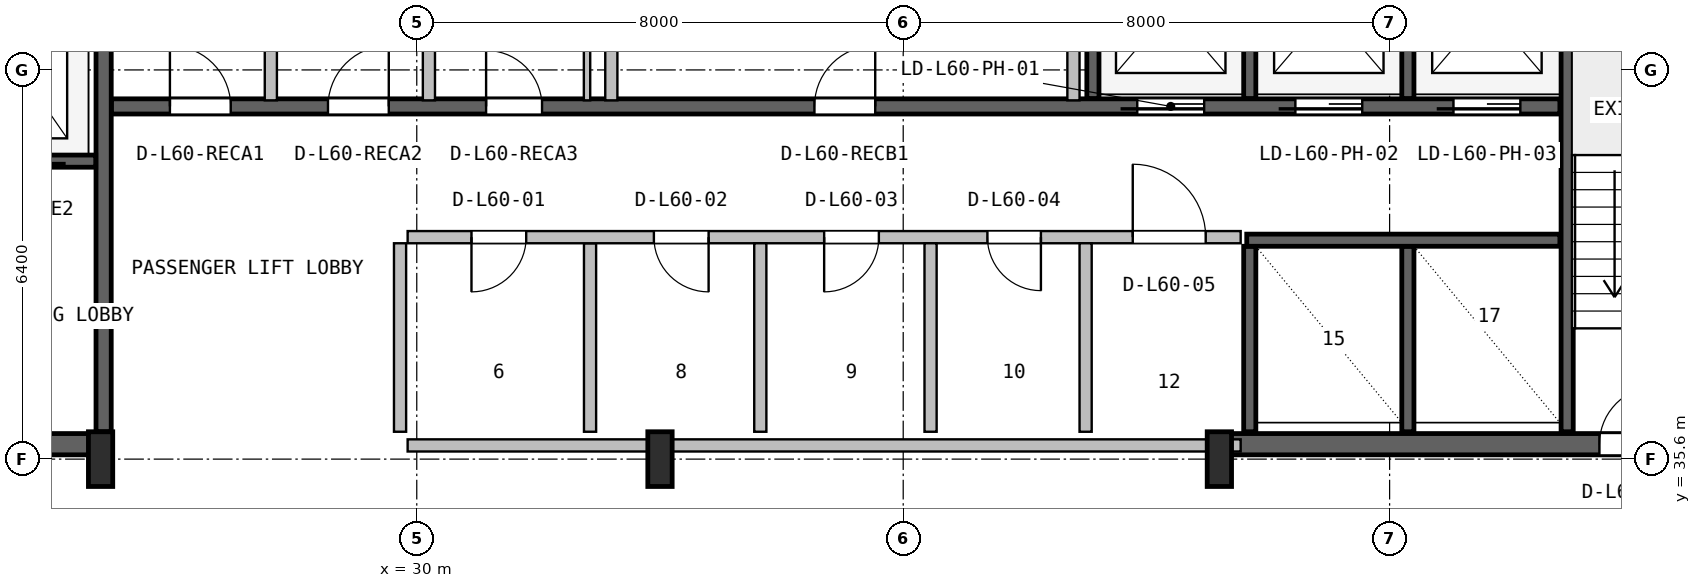
"""IFC4 building model, lengths in metres.
Left out: names, types, materials, properties, quantities, classifications, styles, units other than length and angle.
Written with IfcOpenShell. Run it as: python <this file> out.ifc"""

import sys

from ifc_helpers import new_model, si_unit, direction, frame, frame_2d, origin, origin_2d, place, context, subcontext, project, spatial, rectangle, i_section, extrude, source, transform, mapped, element, fill, save


model = new_model("IFC4")
c1 = context("Model", 3, precision=1e-05, world=origin(), true_north=direction((0.0, 1.0)))
c2 = subcontext(c1, "Body", "Model", "MODEL_VIEW")
j1 = project(units=[si_unit("LENGTHUNIT", "METRE"), si_unit("PLANEANGLEUNIT", "RADIAN")], contexts=[c1])
p1 = place(None, origin())
s1 = spatial("IfcSite", under=j1, at=p1, CompositionType="ELEMENT")
p2 = place(p1, origin())
s2 = spatial("IfcBuilding", under=s1, at=p2, CompositionType="ELEMENT")
p3 = place(p2, frame((0.0, 0.0, 243.2)))
s3 = spatial("IfcBuildingStorey", under=s2, at=p3, CompositionType="ELEMENT", Elevation=243.2)
p4 = place(p3, frame((15.67, 35.845, 0.0), z_axis=(0.0, 0.0, 1.0), x_axis=(1.0, 0.0, 0.0)))
e1 = element("IfcWall", 1, at=p4, inside=s3, PredefinedType="SHEAR", context=c2, shape_type="SweptSolid", body=[
    extrude(rectangle(XDim=9.13, YDim=0.35, at=frame_2d((4.565, 0.0))), origin(), (0.0, 0.0, 1.0), 3.55),
])
p5 = place(p4, frame((5.4, 0.0, 0.0)))
e2 = element("IfcOpeningElement", 2, at=p5, cuts=e1, PredefinedType="OPENING", context=c2, shape_type="SweptSolid", body=[
    extrude(rectangle(XDim=1.0, YDim=2.1, at=frame_2d((0.5, 1.05))), frame((0.0, 0.185, 0.0), z_axis=(0.0, -1.0, 0.0), x_axis=(1.0, 0.0, 0.0)), (0.0, 0.0, 1.0), 0.37),
])
p6 = place(p3, frame((43.2, 35.845, 0.0), z_axis=(0.0, 0.0, 1.0), x_axis=(1.0, 0.0, 0.0)))
e3 = element("IfcWall", 3, at=p6, inside=s3, PredefinedType="SHEAR", context=c2, shape_type="SweptSolid", body=[
    extrude(rectangle(XDim=9.13, YDim=0.35, at=frame_2d((4.565, 0.0))), origin(), (0.0, 0.0, 1.0), 3.55),
])
p7 = place(p6, frame((6.25, 0.0, 0.0)))
e4 = element("IfcOpeningElement", 4, at=p7, cuts=e3, PredefinedType="OPENING", context=c2, shape_type="SweptSolid", body=[
    extrude(rectangle(XDim=0.95, YDim=2.1, at=frame_2d((0.475, 1.05))), frame((0.0, 0.185, 0.0), z_axis=(0.0, -1.0, 0.0), x_axis=(1.0, 0.0, 0.0)), (0.0, 0.0, 1.0), 0.37),
])
m1 = source(origin(), c2, "Body", "SweptSolid", [
    extrude(i_section(OverallWidth=0.4, OverallDepth=0.9, WebThickness=0.016, FlangeThickness=0.028, FilletRadius=0.016, at=origin_2d()), origin(), (0.0, 0.0, 1.0), 3.8),
])
for number, where, z_axis, x_axis in (
    (5, (24.8, 35.6, 0.0), (0.0, 0.0, 1.0), (1.0, 0.0, 0.0)),
    (6, (34.0, 35.6, 0.0), (0.0, 0.0, 1.0), (1.0, 0.0, 0.0)),
    (7, (43.2, 35.6, 0.0), (0.0, 0.0, 1.0), (1.0, 0.0, 0.0)),
):
    element("IfcColumn", number, at=place(p3, frame(where, z_axis=z_axis, x_axis=x_axis)), inside=s3, PredefinedType="COLUMN", context=c2, shape_type="MappedRepresentation", body=[
        mapped(m1, transform((0.0, 0.0, 0.0), x_axis=(1.0, 0.0, 0.0), y_axis=(0.0, 1.0, 0.0), z_axis=(0.0, 0.0, 1.0), scale=1.0)),
    ])
p8 = place(p3, frame((24.85, 36.05, 0.0), z_axis=(0.0, 0.0, 1.0), x_axis=(0.0, 1.0, 0.0)))
e8 = element("IfcWall", 8, at=p8, inside=s3, PredefinedType="SHEAR", context=c2, shape_type="SweptSolid", body=[
    extrude(rectangle(XDim=10.45, YDim=0.25, at=frame_2d((5.225, 0.0))), origin(), (0.0, 0.0, 1.0), 3.55),
])
p9 = place(p3, frame((19.2, 40.5, 0.0), z_axis=(0.0, 0.0, 1.0), x_axis=(1.0, 0.0, 0.0)))
e9 = element("IfcWall", 9, at=p9, inside=s3, PredefinedType="SHEAR", context=c2, shape_type="SweptSolid", body=[
    extrude(rectangle(XDim=5.52, YDim=0.2, at=frame_2d((2.76, 0.0))), origin(), (0.0, 0.0, 1.0), 3.55),
])
p10 = place(p9, frame((1.05, 0.0, 0.0)))
e10 = element("IfcOpeningElement", 10, at=p10, cuts=e9, PredefinedType="OPENING", context=c2, shape_type="SweptSolid", body=[
    extrude(rectangle(XDim=1.1, YDim=2.18, at=frame_2d((0.55, 1.09))), frame((0.0, 0.11, 0.0), z_axis=(0.0, -1.0, 0.0), x_axis=(1.0, 0.0, 0.0)), (0.0, 0.0, 1.0), 0.22),
])
p11 = place(p9, frame((3.65, 0.0, 0.0)))
e11 = element("IfcOpeningElement", 11, at=p11, cuts=e9, PredefinedType="OPENING", context=c2, shape_type="SweptSolid", body=[
    extrude(rectangle(XDim=1.1, YDim=2.18, at=frame_2d((0.55, 1.09))), frame((0.0, 0.11, 0.0), z_axis=(0.0, -1.0, 0.0), x_axis=(1.0, 0.0, 0.0)), (0.0, 0.0, 1.0), 0.22),
])
p12 = place(p3, frame((48.92, 36.05, 0.0), z_axis=(0.0, 0.0, 1.0), x_axis=(0.0, 1.0, 0.0)))
e12 = element("IfcWall", 12, at=p12, inside=s3, PredefinedType="SHEAR", context=c2, shape_type="SweptSolid", body=[
    extrude(rectangle(XDim=10.5, YDim=0.2, at=frame_2d((5.25, 0.0))), origin(), (0.0, 0.0, 1.0), 3.55),
])
p13 = place(p3, frame((24.98, 41.4, 0.0), z_axis=(0.0, 0.0, 1.0), x_axis=(1.0, 0.0, 0.0)))
e13 = element("IfcWall", 13, at=p13, inside=s3, PredefinedType="SHEAR", context=c2, shape_type="SweptSolid", body=[
    extrude(rectangle(XDim=23.82, YDim=0.25, at=frame_2d((11.91, 0.0))), origin(), (0.0, 0.0, 1.0), 3.55),
])
p14 = place(p13, frame((16.87, 0.0, 0.0)))
e14 = element("IfcOpeningElement", 14, at=p14, cuts=e13, PredefinedType="OPENING", context=c2, shape_type="SweptSolid", body=[
    extrude(rectangle(XDim=1.1, YDim=2.18, at=frame_2d((0.55, 1.09))), frame((0.0, 0.135, 0.0), z_axis=(0.0, -1.0, 0.0), x_axis=(1.0, 0.0, 0.0)), (0.0, 0.0, 1.0), 0.27),
])
p15 = place(p13, frame((19.47, 0.0, 0.0)))
e15 = element("IfcOpeningElement", 15, at=p15, cuts=e13, PredefinedType="OPENING", context=c2, shape_type="SweptSolid", body=[
    extrude(rectangle(XDim=1.1, YDim=2.18, at=frame_2d((0.55, 1.09))), frame((0.0, 0.135, 0.0), z_axis=(0.0, -1.0, 0.0), x_axis=(1.0, 0.0, 0.0)), (0.0, 0.0, 1.0), 0.27),
])
p16 = place(p13, frame((22.07, 0.0, 0.0)))
e16 = element("IfcOpeningElement", 16, at=p16, cuts=e13, PredefinedType="OPENING", context=c2, shape_type="SweptSolid", body=[
    extrude(rectangle(XDim=1.1, YDim=2.18, at=frame_2d((0.55, 1.09))), frame((0.0, 0.135, 0.0), z_axis=(0.0, -1.0, 0.0), x_axis=(1.0, 0.0, 0.0)), (0.0, 0.0, 1.0), 0.27),
])
p17 = place(p13, frame((0.96, 0.0, 0.0)))
e17 = element("IfcOpeningElement", 17, at=p17, cuts=e13, PredefinedType="OPENING", context=c2, shape_type="SweptSolid", body=[
    extrude(rectangle(XDim=1.0, YDim=2.08, at=frame_2d((0.5, 1.04))), frame((0.0, 0.135, 0.0), z_axis=(0.0, -1.0, 0.0), x_axis=(1.0, 0.0, 0.0)), (0.0, 0.0, 1.0), 0.27),
])
p18 = place(p13, frame((3.56, 0.0, 0.0)))
e18 = element("IfcOpeningElement", 18, at=p18, cuts=e13, PredefinedType="OPENING", context=c2, shape_type="SweptSolid", body=[
    extrude(rectangle(XDim=1.0, YDim=2.08, at=frame_2d((0.5, 1.04))), frame((0.0, 0.135, 0.0), z_axis=(0.0, -1.0, 0.0), x_axis=(1.0, 0.0, 0.0)), (0.0, 0.0, 1.0), 0.27),
])
p19 = place(p13, frame((6.16, 0.0, 0.0)))
e19 = element("IfcOpeningElement", 19, at=p19, cuts=e13, PredefinedType="OPENING", context=c2, shape_type="SweptSolid", body=[
    extrude(rectangle(XDim=0.92, YDim=2.08, at=frame_2d((0.46, 1.04))), frame((0.0, 0.135, 0.0), z_axis=(0.0, -1.0, 0.0), x_axis=(1.0, 0.0, 0.0)), (0.0, 0.0, 1.0), 0.27),
])
p20 = place(p13, frame((11.56, 0.0, 0.0)))
e20 = element("IfcOpeningElement", 20, at=p20, cuts=e13, PredefinedType="OPENING", context=c2, shape_type="SweptSolid", body=[
    extrude(rectangle(XDim=1.0, YDim=2.08, at=frame_2d((0.5, 1.04))), frame((0.0, 0.135, 0.0), z_axis=(0.0, -1.0, 0.0), x_axis=(1.0, 0.0, 0.0)), (0.0, 0.0, 1.0), 0.27),
])
p21 = place(p3, frame((41.12, 41.53, 0.0), z_axis=(0.0, 0.0, 1.0), x_axis=(0.0, 1.0, 0.0)))
e21 = element("IfcWall", 21, at=p21, inside=s3, PredefinedType="SHEAR", context=c2, shape_type="SweptSolid", body=[
    extrude(rectangle(XDim=5.02, YDim=0.2, at=frame_2d((2.51, 0.0))), origin(), (0.0, 0.0, 1.0), 3.55),
])
for number, where, z_axis, x_axis in (
    (22, (43.7, 41.53, 0.0), (0.0, 0.0, 1.0), (0.0, 1.0, 0.0)),
    (23, (46.3, 41.53, 0.0), (0.0, 0.0, 1.0), (0.0, 1.0, 0.0)),
):
    element("IfcWall", number, at=place(p3, frame(where, z_axis=z_axis, x_axis=x_axis)), inside=s3, PredefinedType="SHEAR", context=c2, shape_type="SweptSolid", body=[
        extrude(rectangle(XDim=2.87, YDim=0.2, at=frame_2d((1.435, 0.0))), origin(), (0.0, 0.0, 1.0), 3.55),
    ])
for number, where, z_axis, x_axis in (
    (24, (43.7, 36.05, 0.0), (0.0, 0.0, 1.0), (0.0, 1.0, 0.0)),
    (25, (46.3, 36.05, 0.0), (0.0, 0.0, 1.0), (0.0, 1.0, 0.0)),
):
    element("IfcWall", number, at=place(p3, frame(where, z_axis=z_axis, x_axis=x_axis)), inside=s3, PredefinedType="SHEAR", context=c2, shape_type="SweptSolid", body=[
        extrude(rectangle(XDim=3.05, YDim=0.2, at=frame_2d((1.525, 0.0))), origin(), (0.0, 0.0, 1.0), 3.55),
    ])
p22 = place(p3, frame((43.65, 39.2, 0.0), z_axis=(0.0, 0.0, 1.0), x_axis=(1.0, 0.0, 0.0)))
e26 = element("IfcWall", 26, at=p22, inside=s3, PredefinedType="SHEAR", context=c2, shape_type="SweptSolid", body=[
    extrude(rectangle(XDim=5.15, YDim=0.2, at=frame_2d((2.575, 0.0))), origin(), (0.0, 0.0, 1.0), 3.55),
])
p23 = place(p3, frame((29.85, 35.825, 0.0), z_axis=(0.0, 0.0, 1.0), x_axis=(1.0, 0.0, 0.0)))
e27 = element("IfcWall", 27, at=p23, inside=s3, PredefinedType="SOLIDWALL", context=c2, shape_type="SweptSolid", body=[
    extrude(rectangle(XDim=13.7, YDim=0.2, at=frame_2d((6.85, 0.0))), origin(), (0.0, 0.0, 1.0), 2.575),
])
p24 = place(p3, frame((32.85, 36.05, 0.0), z_axis=(0.0, 0.0, 1.0), x_axis=(0.0, 1.0, 0.0)))
e28 = element("IfcWall", 28, at=p24, inside=s3, PredefinedType="PLUMBINGWALL", context=c2, shape_type="SweptSolid", body=[
    extrude(rectangle(XDim=3.1, YDim=0.2, at=frame_2d((1.55, 0.0))), origin(), (0.0, 0.0, 1.0), 3.53),
])
p25 = place(p3, frame((29.85, 39.25, 0.0), z_axis=(0.0, 0.0, 1.0), x_axis=(1.0, 0.0, 0.0)))
e29 = element("IfcWall", 29, at=p25, inside=s3, PredefinedType="SOLIDWALL", context=c2, shape_type="SweptSolid", body=[
    extrude(rectangle(XDim=13.7, YDim=0.2, at=frame_2d((6.85, 0.0))), origin(), (0.0, 0.0, 1.0), 3.53),
])
p26 = place(p25, frame((1.05, 0.0, 0.0)))
e30 = element("IfcOpeningElement", 30, at=p26, cuts=e29, PredefinedType="OPENING", context=c2, shape_type="SweptSolid", body=[
    extrude(rectangle(XDim=0.9, YDim=2.06, at=frame_2d((0.45, 1.03))), frame((0.0, 0.11, 0.0), z_axis=(0.0, -1.0, 0.0), x_axis=(1.0, 0.0, 0.0)), (0.0, 0.0, 1.0), 0.22),
])
p27 = place(p25, frame((4.05, 0.0, 0.0)))
e31 = element("IfcOpeningElement", 31, at=p27, cuts=e29, PredefinedType="OPENING", context=c2, shape_type="SweptSolid", body=[
    extrude(rectangle(XDim=0.9, YDim=2.06, at=frame_2d((0.45, 1.03))), frame((0.0, 0.11, 0.0), z_axis=(0.0, -1.0, 0.0), x_axis=(1.0, 0.0, 0.0)), (0.0, 0.0, 1.0), 0.22),
])
p28 = place(p25, frame((6.85, 0.0, 0.0)))
e32 = element("IfcOpeningElement", 32, at=p28, cuts=e29, PredefinedType="OPENING", context=c2, shape_type="SweptSolid", body=[
    extrude(rectangle(XDim=0.9, YDim=2.06, at=frame_2d((0.45, 1.03))), frame((0.0, 0.11, 0.0), z_axis=(0.0, -1.0, 0.0), x_axis=(1.0, 0.0, 0.0)), (0.0, 0.0, 1.0), 0.22),
])
p29 = place(p25, frame((9.535, 0.0, 0.0)))
e33 = element("IfcOpeningElement", 33, at=p29, cuts=e29, PredefinedType="OPENING", context=c2, shape_type="SweptSolid", body=[
    extrude(rectangle(XDim=0.88, YDim=2.06, at=frame_2d((0.44, 1.03))), frame((0.0, 0.11, 0.0), z_axis=(0.0, -1.0, 0.0), x_axis=(1.0, 0.0, 0.0)), (0.0, 0.0, 1.0), 0.22),
])
p30 = place(p25, frame((11.925, 0.0, 0.0)))
e34 = element("IfcOpeningElement", 34, at=p30, cuts=e29, PredefinedType="OPENING", context=c2, shape_type="SweptSolid", body=[
    extrude(rectangle(XDim=1.2, YDim=2.1, at=frame_2d((0.6, 1.05))), frame((0.0, 0.11, 0.0), z_axis=(0.0, -1.0, 0.0), x_axis=(1.0, 0.0, 0.0)), (0.0, 0.0, 1.0), 0.22),
])
for number, where, z_axis, x_axis in (
    (35, (29.725, 36.05, 0.0), (0.0, 0.0, 1.0), (0.0, 1.0, 0.0)),
    (36, (35.65, 36.05, 0.0), (0.0, 0.0, 1.0), (0.0, 1.0, 0.0)),
    (37, (38.45, 36.05, 0.0), (0.0, 0.0, 1.0), (0.0, 1.0, 0.0)),
):
    element("IfcWall", number, at=place(p3, frame(where, z_axis=z_axis, x_axis=x_axis)), inside=s3, PredefinedType="PLUMBINGWALL", context=c2, shape_type="SweptSolid", body=[
        extrude(rectangle(XDim=3.1, YDim=0.2, at=frame_2d((1.55, 0.0))), origin(), (0.0, 0.0, 1.0), 3.53),
    ])
p31 = place(p3, frame((41.0, 36.05, 0.0), z_axis=(0.0, 0.0, 1.0), x_axis=(0.0, 1.0, 0.0)))
e38 = element("IfcWall", 38, at=p31, inside=s3, PredefinedType="SOLIDWALL", context=c2, shape_type="SweptSolid", body=[
    extrude(rectangle(XDim=3.1, YDim=0.2, at=frame_2d((1.55, 0.0))), origin(), (0.0, 0.0, 1.0), 3.53),
])
for number, where, z_axis, x_axis in (
    (39, (27.6, 41.5, 0.0), (0.0, 0.0, 1.0), (0.0, 1.0, 0.0)),
    (40, (30.2, 41.5, 0.0), (0.0, 0.0, 1.0), (0.0, 1.0, 0.0)),
):
    element("IfcWall", number, at=place(p3, frame(where, z_axis=z_axis, x_axis=x_axis)), inside=s3, PredefinedType="SOLIDWALL", context=c2, shape_type="SweptSolid", body=[
        extrude(rectangle(XDim=5.02, YDim=0.2, at=frame_2d((2.51, 0.0))), origin(), (0.0, 0.0, 1.0), 3.53),
    ])
p32 = place(p3, frame((32.8, 41.5, 0.0), z_axis=(0.0, 0.0, 1.0), x_axis=(0.0, 1.0, 0.0)))
e41 = element("IfcWall", 41, at=p32, inside=s3, PredefinedType="PARTITIONING", context=c2, shape_type="SweptSolid", body=[
    extrude(rectangle(XDim=5.02, YDim=0.105, at=frame_2d((2.51, 0.0))), origin(), (0.0, 0.0, 1.0), 3.53),
])
for number, where, z_axis, x_axis in (
    (42, (40.8, 41.5, 0.0), (0.0, 0.0, 1.0), (0.0, 1.0, 0.0)),
    (43, (33.2, 41.5, 0.0), (0.0, 0.0, 1.0), (0.0, 1.0, 0.0)),
):
    element("IfcWall", number, at=place(p3, frame(where, z_axis=z_axis, x_axis=x_axis)), inside=s3, PredefinedType="SOLIDWALL", context=c2, shape_type="SweptSolid", body=[
        extrude(rectangle(XDim=5.02, YDim=0.2, at=frame_2d((2.51, 0.0))), origin(), (0.0, 0.0, 1.0), 3.53),
    ])
m2 = source(origin(), c2, "Body", "SweptSolid", [
    extrude(rectangle(XDim=0.95, YDim=2.1, at=frame_2d((0.475, 1.05))), frame((0.0, 0.025, 0.0), z_axis=(0.0, -1.0, 0.0), x_axis=(1.0, 0.0, 0.0)), (0.0, 0.0, 1.0), 0.05),
])
p33 = place(p7, origin())
e44 = element("IfcDoor", 44, at=p33, inside=s3, OperationType="SINGLE_SWING_RIGHT", PredefinedType="DOOR", context=c2, shape_type="MappedRepresentation", body=[
    mapped(m2, transform((0.0, 0.0, 0.0), x_axis=(1.0, 0.0, 0.0), y_axis=(0.0, 1.0, 0.0), z_axis=(0.0, 0.0, 1.0), scale=1.0)),
])
fill(e4, e44)
m3 = source(origin(), c2, "Body", "SweptSolid", [
    extrude(rectangle(XDim=1.1, YDim=2.18, at=frame_2d((0.55, 1.09))), frame((0.0, 0.025, 0.0), z_axis=(0.0, -1.0, 0.0), x_axis=(1.0, 0.0, 0.0)), (0.0, 0.0, 1.0), 0.05),
])
p34 = place(p14, frame((1.1, 0.0, 0.0), z_axis=(0.0, 0.0, 1.0), x_axis=(-1.0, 0.0, 0.0)))
e45 = element("IfcDoor", 45, at=p34, inside=s3, OperationType="SLIDING_TO_LEFT", PredefinedType="DOOR", context=c2, shape_type="MappedRepresentation", body=[
    mapped(m3, transform((0.0, 0.0, 0.0), x_axis=(1.0, 0.0, 0.0), y_axis=(0.0, 1.0, 0.0), z_axis=(0.0, 0.0, 1.0), scale=1.0)),
])
fill(e14, e45)
p35 = place(p15, frame((1.1, 0.0, 0.0), z_axis=(0.0, 0.0, 1.0), x_axis=(-1.0, 0.0, 0.0)))
e46 = element("IfcDoor", 46, at=p35, inside=s3, OperationType="SLIDING_TO_LEFT", PredefinedType="DOOR", context=c2, shape_type="MappedRepresentation", body=[
    mapped(m3, transform((0.0, 0.0, 0.0), x_axis=(1.0, 0.0, 0.0), y_axis=(0.0, 1.0, 0.0), z_axis=(0.0, 0.0, 1.0), scale=1.0)),
])
fill(e15, e46)
p36 = place(p16, frame((1.1, 0.0, 0.0), z_axis=(0.0, 0.0, 1.0), x_axis=(-1.0, 0.0, 0.0)))
e47 = element("IfcDoor", 47, at=p36, inside=s3, OperationType="SLIDING_TO_LEFT", PredefinedType="DOOR", context=c2, shape_type="MappedRepresentation", body=[
    mapped(m3, transform((0.0, 0.0, 0.0), x_axis=(1.0, 0.0, 0.0), y_axis=(0.0, 1.0, 0.0), z_axis=(0.0, 0.0, 1.0), scale=1.0)),
])
fill(e16, e47)
m4 = source(origin(), c2, "Body", "SweptSolid", [
    extrude(rectangle(XDim=1.0, YDim=2.08, at=frame_2d((0.5, 1.04))), frame((0.0, 0.025, 0.0), z_axis=(0.0, -1.0, 0.0), x_axis=(1.0, 0.0, 0.0)), (0.0, 0.0, 1.0), 0.05),
])
p37 = place(p17, origin())
e48 = element("IfcDoor", 48, at=p37, inside=s3, OperationType="SINGLE_SWING_LEFT", PredefinedType="DOOR", context=c2, shape_type="MappedRepresentation", body=[
    mapped(m4, transform((0.0, 0.0, 0.0), x_axis=(1.0, 0.0, 0.0), y_axis=(0.0, 1.0, 0.0), z_axis=(0.0, 0.0, 1.0), scale=1.0)),
])
fill(e17, e48)
p38 = place(p18, origin())
e49 = element("IfcDoor", 49, at=p38, inside=s3, OperationType="SINGLE_SWING_RIGHT", PredefinedType="DOOR", context=c2, shape_type="MappedRepresentation", body=[
    mapped(m4, transform((0.0, 0.0, 0.0), x_axis=(1.0, 0.0, 0.0), y_axis=(0.0, 1.0, 0.0), z_axis=(0.0, 0.0, 1.0), scale=1.0)),
])
fill(e18, e49)
m5 = source(origin(), c2, "Body", "SweptSolid", [
    extrude(rectangle(XDim=0.92, YDim=2.08, at=frame_2d((0.46, 1.04))), frame((0.0, 0.025, 0.0), z_axis=(0.0, -1.0, 0.0), x_axis=(1.0, 0.0, 0.0)), (0.0, 0.0, 1.0), 0.05),
])
p39 = place(p19, origin())
e50 = element("IfcDoor", 50, at=p39, inside=s3, OperationType="SINGLE_SWING_LEFT", PredefinedType="DOOR", context=c2, shape_type="MappedRepresentation", body=[
    mapped(m5, transform((0.0, 0.0, 0.0), x_axis=(1.0, 0.0, 0.0), y_axis=(0.0, 1.0, 0.0), z_axis=(0.0, 0.0, 1.0), scale=1.0)),
])
fill(e19, e50)
p40 = place(p20, origin())
e51 = element("IfcDoor", 51, at=p40, inside=s3, OperationType="SINGLE_SWING_RIGHT", PredefinedType="DOOR", context=c2, shape_type="MappedRepresentation", body=[
    mapped(m4, transform((0.0, 0.0, 0.0), x_axis=(1.0, 0.0, 0.0), y_axis=(0.0, 1.0, 0.0), z_axis=(0.0, 0.0, 1.0), scale=1.0)),
])
fill(e20, e51)
m6 = source(origin(), c2, "Body", "SweptSolid", [
    extrude(rectangle(XDim=0.9, YDim=2.06, at=frame_2d((0.45, 1.03))), frame((0.0, 0.025, 0.0), z_axis=(0.0, -1.0, 0.0), x_axis=(1.0, 0.0, 0.0)), (0.0, 0.0, 1.0), 0.05),
])
p41 = place(p26, frame((0.9, 0.0, 0.0), z_axis=(0.0, 0.0, 1.0), x_axis=(-1.0, 0.0, 0.0)))
e52 = element("IfcDoor", 52, at=p41, inside=s3, OperationType="SINGLE_SWING_LEFT", PredefinedType="DOOR", context=c2, shape_type="MappedRepresentation", body=[
    mapped(m6, transform((0.0, 0.0, 0.0), x_axis=(1.0, 0.0, 0.0), y_axis=(0.0, 1.0, 0.0), z_axis=(0.0, 0.0, 1.0), scale=1.0)),
])
fill(e30, e52)
p42 = place(p27, frame((0.9, 0.0, 0.0), z_axis=(0.0, 0.0, 1.0), x_axis=(-1.0, 0.0, 0.0)))
e53 = element("IfcDoor", 53, at=p42, inside=s3, OperationType="SINGLE_SWING_RIGHT", PredefinedType="DOOR", context=c2, shape_type="MappedRepresentation", body=[
    mapped(m6, transform((0.0, 0.0, 0.0), x_axis=(1.0, 0.0, 0.0), y_axis=(0.0, 1.0, 0.0), z_axis=(0.0, 0.0, 1.0), scale=1.0)),
])
fill(e31, e53)
p43 = place(p28, frame((0.9, 0.0, 0.0), z_axis=(0.0, 0.0, 1.0), x_axis=(-1.0, 0.0, 0.0)))
e54 = element("IfcDoor", 54, at=p43, inside=s3, OperationType="SINGLE_SWING_LEFT", PredefinedType="DOOR", context=c2, shape_type="MappedRepresentation", body=[
    mapped(m6, transform((0.0, 0.0, 0.0), x_axis=(1.0, 0.0, 0.0), y_axis=(0.0, 1.0, 0.0), z_axis=(0.0, 0.0, 1.0), scale=1.0)),
])
fill(e32, e54)
m7 = source(origin(), c2, "Body", "SweptSolid", [
    extrude(rectangle(XDim=0.88, YDim=2.06, at=frame_2d((0.44, 1.03))), frame((0.0, 0.025, 0.0), z_axis=(0.0, -1.0, 0.0), x_axis=(1.0, 0.0, 0.0)), (0.0, 0.0, 1.0), 0.05),
])
p44 = place(p29, frame((0.88, 0.0, 0.0), z_axis=(0.0, 0.0, 1.0), x_axis=(-1.0, 0.0, 0.0)))
e55 = element("IfcDoor", 55, at=p44, inside=s3, OperationType="SINGLE_SWING_RIGHT", PredefinedType="DOOR", context=c2, shape_type="MappedRepresentation", body=[
    mapped(m7, transform((0.0, 0.0, 0.0), x_axis=(1.0, 0.0, 0.0), y_axis=(0.0, 1.0, 0.0), z_axis=(0.0, 0.0, 1.0), scale=1.0)),
])
fill(e33, e55)
m8 = source(origin(), c2, "Body", "SweptSolid", [
    extrude(rectangle(XDim=1.2, YDim=2.1, at=frame_2d((0.6, 1.05))), frame((0.0, 0.025, 0.0), z_axis=(0.0, -1.0, 0.0), x_axis=(1.0, 0.0, 0.0)), (0.0, 0.0, 1.0), 0.05),
])
p45 = place(p30, origin())
e56 = element("IfcDoor", 56, at=p45, inside=s3, OperationType="SINGLE_SWING_LEFT", PredefinedType="DOOR", context=c2, shape_type="MappedRepresentation", body=[
    mapped(m8, transform((0.0, 0.0, 0.0), x_axis=(1.0, 0.0, 0.0), y_axis=(0.0, 1.0, 0.0), z_axis=(0.0, 0.0, 1.0), scale=1.0)),
])
fill(e34, e56)
save(model, sys.argv[1])
